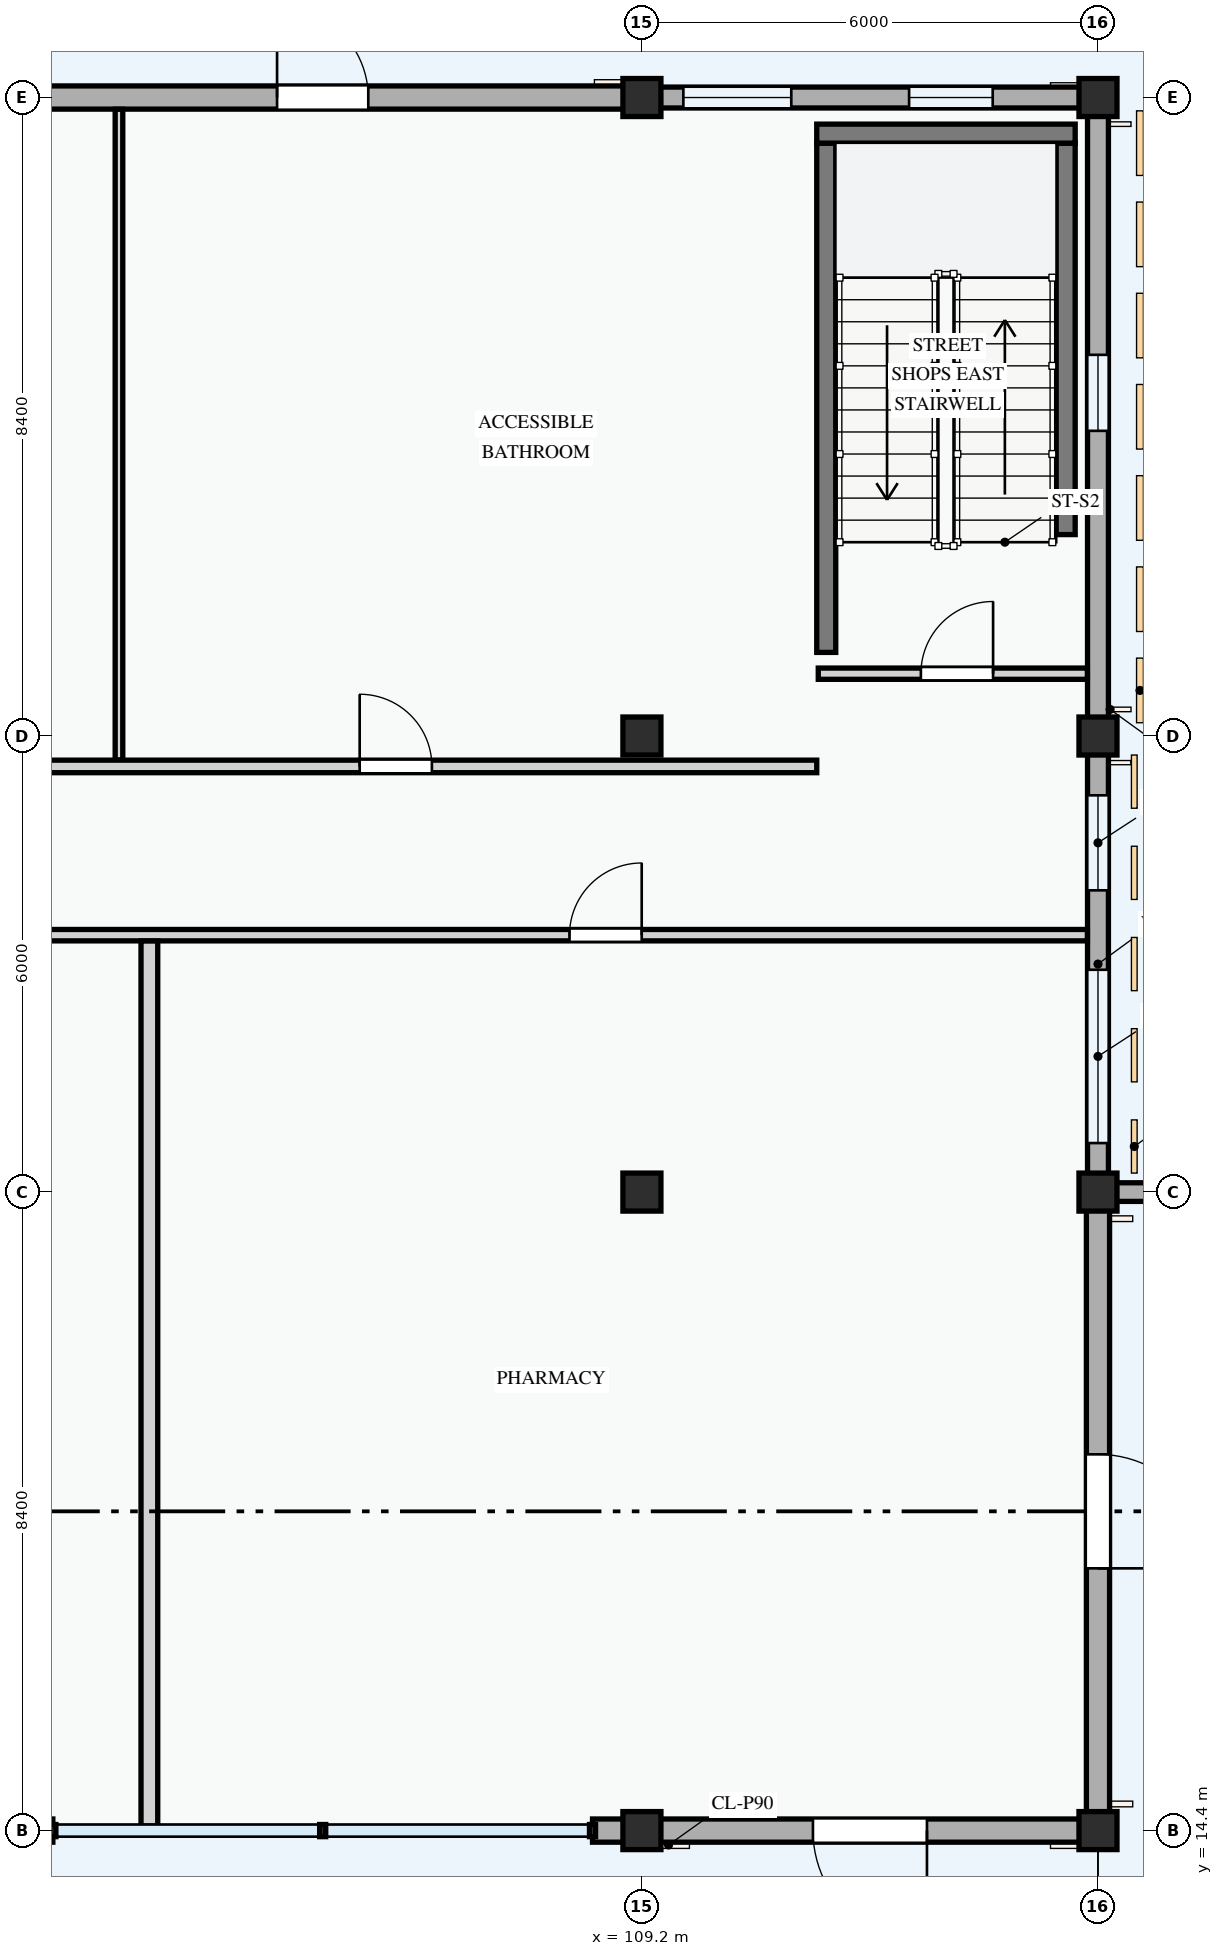
"""IFC4 building model, lengths in metres.
Left out: names, types, materials, properties, quantities, classifications, styles, units other than length and angle.
Written with IfcOpenShell. Run it as: python <this file> out.ifc"""

import sys

from ifc_helpers import new_model, si_unit, direction, frame, frame_2d, origin, origin_2d, place, context, subcontext, project, spatial, rectangle, circle, extrude, element, fill, save


model = new_model("IFC4")
c1 = context("Model", 3, precision=1e-05, world=origin(), true_north=direction((0.0, 1.0)))
c2 = subcontext(c1, "Body", "Model", "MODEL_VIEW")
j1 = project(units=[si_unit("LENGTHUNIT", "METRE"), si_unit("PLANEANGLEUNIT", "RADIAN")], contexts=[c1])
p1 = place(None, origin())
s1 = spatial("IfcSite", under=j1, at=p1, CompositionType="ELEMENT")
p2 = place(p1, origin())
s2 = spatial("IfcBuilding", under=s1, at=p2, CompositionType="ELEMENT")
p3 = place(p2, origin())
s3 = spatial("IfcBuildingStorey", under=s2, at=p3, CompositionType="ELEMENT", Elevation=0.0)
p4 = place(p3, frame((109.2, 14.4, 0.0), z_axis=(0.0, 0.0, 1.0), x_axis=(1.0, 0.0, 0.0)))
e1 = element("IfcColumn", 1, at=p4, inside=s3, PredefinedType="COLUMN", context=c2, shape_type="SweptSolid", body=[
    extrude(rectangle(XDim=0.5, YDim=0.5, at=origin_2d()), origin(), (0.0, 0.0, 1.0), 4.5),
])
for number, where, z_axis, x_axis in (
    (2, (109.2, 22.8, 0.0), (0.0, 0.0, 1.0), (1.0, 0.0, 0.0)),
    (3, (109.2, 28.8, 0.0), (0.0, 0.0, 1.0), (1.0, 0.0, 0.0)),
):
    element("IfcColumn", number, at=place(p3, frame(where, z_axis=z_axis, x_axis=x_axis)), inside=s3, PredefinedType="COLUMN", context=c2, shape_type="SweptSolid", body=[
        extrude(circle(Radius=0.25, at=origin_2d()), origin(), (0.0, 0.0, 1.0), 4.5),
    ])
for number, where, z_axis, x_axis in (
    (4, (109.2, 37.2, 0.0), (0.0, 0.0, 1.0), (1.0, 0.0, 0.0)),
    (5, (115.2, 14.4, 0.0), (0.0, 0.0, 1.0), (1.0, 0.0, 0.0)),
    (6, (115.2, 22.8, 0.0), (0.0, 0.0, 1.0), (1.0, 0.0, 0.0)),
    (7, (115.2, 28.8, 0.0), (0.0, 0.0, 1.0), (1.0, 0.0, 0.0)),
    (8, (115.2, 37.2, 0.0), (0.0, 0.0, 1.0), (1.0, 0.0, 0.0)),
):
    element("IfcColumn", number, at=place(p3, frame(where, z_axis=z_axis, x_axis=x_axis)), inside=s3, PredefinedType="COLUMN", context=c2, shape_type="SweptSolid", body=[
        extrude(rectangle(XDim=0.5, YDim=0.5, at=origin_2d()), origin(), (0.0, 0.0, 1.0), 4.5),
    ])
p5 = place(p3, frame((108.55, 14.4, 0.0), z_axis=(0.0, 0.0, 1.0), x_axis=(1.0, 0.0, 0.0)))
e9 = element("IfcWall", 9, at=p5, inside=s3, PredefinedType="STANDARD", context=c2, shape_type="SweptSolid", body=[
    extrude(rectangle(XDim=0.65, YDim=0.305, at=frame_2d((0.325, 0.0))), origin(), (0.0, 0.0, 1.0), 3.485),
])
p6 = place(p3, frame((109.2, 14.4, 0.0), z_axis=(0.0, 0.0, 1.0), x_axis=(1.0, 0.0, 0.0)))
e10 = element("IfcWall", 10, at=p6, inside=s3, PredefinedType="STANDARD", context=c2, shape_type="SweptSolid", body=[
    extrude(rectangle(XDim=6.0, YDim=0.305, at=frame_2d((3.0, 0.0))), origin(), (0.0, 0.0, 1.0), 3.585),
])
p7 = place(p6, frame((2.25, 0.0, 0.0)))
e11 = element("IfcOpeningElement", 11, at=p7, cuts=e10, PredefinedType="OPENING", context=c2, shape_type="SweptSolid", body=[
    extrude(rectangle(XDim=1.5, YDim=2.3, at=frame_2d((0.75, 1.15))), frame((0.0, 0.163, 0.0), z_axis=(0.0, -1.0, 0.0), x_axis=(1.0, 0.0, 0.0)), (0.0, 0.0, 1.0), 0.325),
])
p8 = place(p3, frame((115.2, 14.4, 0.0), z_axis=(0.0, 0.0, 1.0), x_axis=(0.0, 1.0, 0.0)))
e12 = element("IfcWall", 12, at=p8, inside=s3, PredefinedType="STANDARD", context=c2, shape_type="SweptSolid", body=[
    extrude(rectangle(XDim=8.4, YDim=0.305, at=frame_2d((4.2, 0.0))), origin(), (0.0, 0.0, 1.0), 3.485),
])
p9 = place(p8, frame((3.45, 0.0, 0.0)))
e13 = element("IfcOpeningElement", 13, at=p9, cuts=e12, PredefinedType="OPENING", context=c2, shape_type="SweptSolid", body=[
    extrude(rectangle(XDim=1.5, YDim=2.3, at=frame_2d((0.75, 1.15))), frame((0.0, 0.163, 0.0), z_axis=(0.0, -1.0, 0.0), x_axis=(1.0, 0.0, 0.0)), (0.0, 0.0, 1.0), 0.325),
])
p10 = place(p3, frame((115.2, 22.8, 0.0), z_axis=(0.0, 0.0, 1.0), x_axis=(0.0, 1.0, 0.0)))
e14 = element("IfcWall", 14, at=p10, inside=s3, PredefinedType="STANDARD", context=c2, shape_type="SweptSolid", body=[
    extrude(rectangle(XDim=6.0, YDim=0.275, at=frame_2d((3.0, 0.0))), origin(), (0.0, 0.0, 1.0), 3.585),
])
p11 = place(p10, frame((0.645, 0.0, 0.8)))
e15 = element("IfcOpeningElement", 15, at=p11, cuts=e14, PredefinedType="OPENING", context=c2, shape_type="SweptSolid", body=[
    extrude(rectangle(XDim=2.28, YDim=1.46, at=frame_2d((1.14, 0.73))), frame((0.0, 0.147, 0.0), z_axis=(0.0, -1.0, 0.0), x_axis=(1.0, 0.0, 0.0)), (0.0, 0.0, 1.0), 0.295),
])
p12 = place(p10, frame((3.97, 0.0, 0.8)))
e16 = element("IfcOpeningElement", 16, at=p12, cuts=e14, PredefinedType="OPENING", context=c2, shape_type="SweptSolid", body=[
    extrude(rectangle(XDim=1.25, YDim=1.45, at=frame_2d((0.625, 0.725))), frame((0.0, 0.147, 0.0), z_axis=(0.0, -1.0, 0.0), x_axis=(1.0, 0.0, 0.0)), (0.0, 0.0, 1.0), 0.295),
])
p13 = place(p3, frame((115.2, 28.8, 0.0), z_axis=(0.0, 0.0, 1.0), x_axis=(0.0, 1.0, 0.0)))
e17 = element("IfcWall", 17, at=p13, inside=s3, PredefinedType="STANDARD", context=c2, shape_type="SweptSolid", body=[
    extrude(rectangle(XDim=8.4, YDim=0.275, at=frame_2d((4.2, 0.0))), origin(), (0.0, 0.0, 1.0), 3.485),
])
p14 = place(p13, frame((4.015, 0.0, 0.8)))
e18 = element("IfcOpeningElement", 18, at=p14, cuts=e17, PredefinedType="OPENING", context=c2, shape_type="SweptSolid", body=[
    extrude(rectangle(XDim=1.0, YDim=1.25, at=frame_2d((0.5, 0.625))), frame((0.0, 0.147, 0.0), z_axis=(0.0, -1.0, 0.0), x_axis=(1.0, 0.0, 0.0)), (0.0, 0.0, 1.0), 0.295),
])
p15 = place(p3, frame((115.2, 37.2, 0.0), z_axis=(0.0, 0.0, 1.0), x_axis=(-1.0, 0.0, 0.0)))
e19 = element("IfcWall", 19, at=p15, inside=s3, PredefinedType="STANDARD", context=c2, shape_type="SweptSolid", body=[
    extrude(rectangle(XDim=6.0, YDim=0.275, at=frame_2d((3.0, 0.0))), origin(), (0.0, 0.0, 1.0), 3.585),
])
p16 = place(p15, frame((1.385, 0.0, 0.8)))
e20 = element("IfcOpeningElement", 20, at=p16, cuts=e19, PredefinedType="OPENING", context=c2, shape_type="SweptSolid", body=[
    extrude(rectangle(XDim=1.1, YDim=1.3, at=frame_2d((0.55, 0.65))), frame((0.0, 0.147, 0.0), z_axis=(0.0, -1.0, 0.0), x_axis=(1.0, 0.0, 0.0)), (0.0, 0.0, 1.0), 0.295),
])
p17 = place(p15, frame((4.035, 0.0, 0.8)))
e21 = element("IfcOpeningElement", 21, at=p17, cuts=e19, PredefinedType="OPENING", context=c2, shape_type="SweptSolid", body=[
    extrude(rectangle(XDim=1.42, YDim=1.38, at=frame_2d((0.71, 0.69))), frame((0.0, 0.147, 0.0), z_axis=(0.0, -1.0, 0.0), x_axis=(1.0, 0.0, 0.0)), (0.0, 0.0, 1.0), 0.295),
])
p18 = place(p3, frame((109.2, 37.2, 0.0), z_axis=(0.0, 0.0, 1.0), x_axis=(-1.0, 0.0, 0.0)))
e22 = element("IfcWall", 22, at=p18, inside=s3, PredefinedType="STANDARD", context=c2, shape_type="SweptSolid", body=[
    extrude(rectangle(XDim=8.4, YDim=0.305, at=frame_2d((4.2, 0.0))), origin(), (0.0, 0.0, 1.0), 3.485),
])
p19 = place(p18, frame((3.6, 0.0, 0.0)))
e23 = element("IfcOpeningElement", 23, at=p19, cuts=e22, PredefinedType="OPENING", context=c2, shape_type="SweptSolid", body=[
    extrude(rectangle(XDim=1.2, YDim=2.2, at=frame_2d((0.6, 1.1))), frame((0.0, 0.163, 0.0), z_axis=(0.0, -1.0, 0.0), x_axis=(1.0, 0.0, 0.0)), (0.0, 0.0, 1.0), 0.325),
])
p20 = place(p3, frame((115.2, 22.8, 0.0), z_axis=(0.0, 0.0, 1.0), x_axis=(1.0, 0.0, 0.0)))
e24 = element("IfcWall", 24, at=p20, inside=s3, PredefinedType="STANDARD", context=c2, shape_type="SweptSolid", body=[
    extrude(rectangle(XDim=8.4, YDim=0.245, at=frame_2d((4.2, 0.0))), origin(), (0.0, 0.0, 1.0), 2.35),
])
p21 = place(p20, frame((3.275, 0.0, 0.0)))
e25 = element("IfcOpeningElement", 25, at=p21, cuts=e24, PredefinedType="OPENING", context=c2, shape_type="SweptSolid", body=[
    extrude(rectangle(XDim=1.85, YDim=2.15, at=frame_2d((0.925, 1.075))), frame((0.0, 0.133, 0.0), z_axis=(0.0, -1.0, 0.0), x_axis=(1.0, 0.0, 0.0)), (0.0, 0.0, 1.0), 0.265),
])
p22 = place(p3, frame((114.775, 31.45, 0.0), z_axis=(0.0, 0.0, 1.0), x_axis=(0.0, 1.0, 0.0)))
e26 = element("IfcWall", 26, at=p22, inside=s3, PredefinedType="SHEAR", context=c2, shape_type="SweptSolid", body=[
    extrude(rectangle(XDim=5.15, YDim=0.25, at=frame_2d((2.575, 0.0))), origin(), (0.0, 0.0, 1.0), 4.2),
])
p23 = place(p3, frame((111.625, 29.9, 0.0), z_axis=(0.0, 0.0, 1.0), x_axis=(0.0, 1.0, 0.0)))
e27 = element("IfcWall", 27, at=p23, inside=s3, PredefinedType="SHEAR", context=c2, shape_type="SweptSolid", body=[
    extrude(rectangle(XDim=6.7, YDim=0.25, at=frame_2d((3.35, 0.0))), origin(), (0.0, 0.0, 1.0), 4.2),
])
p24 = place(p3, frame((114.9, 36.725, 0.0), z_axis=(0.0, 0.0, 1.0), x_axis=(-1.0, 0.0, 0.0)))
e28 = element("IfcWall", 28, at=p24, inside=s3, PredefinedType="SHEAR", context=c2, shape_type="SweptSolid", body=[
    extrude(rectangle(XDim=3.4, YDim=0.25, at=frame_2d((1.7, 0.0))), origin(), (0.0, 0.0, 1.0), 4.2),
])
p25 = place(p3, frame((66.139, 26.18, 0.0), z_axis=(0.0, 0.0, 1.0), x_axis=(1.0, 0.0, 0.0)))
e29 = element("IfcWall", 29, at=p25, inside=s3, PredefinedType="PARTITIONING", context=c2, shape_type="SweptSolid", body=[
    extrude(rectangle(XDim=48.921, YDim=0.15, at=frame_2d((24.46, 0.0))), origin(), (0.0, 0.0, 1.0), 4.2),
])
p26 = place(p25, frame((6.817, 0.0, 0.0)))
e30 = element("IfcOpeningElement", 30, at=p26, cuts=e29, PredefinedType="OPENING", context=c2, shape_type="SweptSolid", body=[
    extrude(rectangle(XDim=0.95, YDim=2.1, at=frame_2d((0.475, 1.05))), frame((0.0, 0.085, 0.0), z_axis=(0.0, -1.0, 0.0), x_axis=(1.0, 0.0, 0.0)), (0.0, 0.0, 1.0), 0.17),
])
p27 = place(p25, frame((18.263, 0.0, 0.0)))
e31 = element("IfcOpeningElement", 31, at=p27, cuts=e29, PredefinedType="OPENING", context=c2, shape_type="SweptSolid", body=[
    extrude(rectangle(XDim=0.95, YDim=2.1, at=frame_2d((0.475, 1.05))), frame((0.0, 0.085, 0.0), z_axis=(0.0, -1.0, 0.0), x_axis=(1.0, 0.0, 0.0)), (0.0, 0.0, 1.0), 0.17),
])
p28 = place(p25, frame((31.139, 0.0, 0.0)))
e32 = element("IfcOpeningElement", 32, at=p28, cuts=e29, PredefinedType="OPENING", context=c2, shape_type="SweptSolid", body=[
    extrude(rectangle(XDim=0.95, YDim=2.1, at=frame_2d((0.475, 1.05))), frame((0.0, 0.085, 0.0), z_axis=(0.0, -1.0, 0.0), x_axis=(1.0, 0.0, 0.0)), (0.0, 0.0, 1.0), 0.17),
])
p29 = place(p25, frame((42.108, 0.0, 0.0)))
e33 = element("IfcOpeningElement", 33, at=p29, cuts=e29, PredefinedType="OPENING", context=c2, shape_type="SweptSolid", body=[
    extrude(rectangle(XDim=0.95, YDim=2.1, at=frame_2d((0.475, 1.05))), frame((0.0, 0.085, 0.0), z_axis=(0.0, -1.0, 0.0), x_axis=(1.0, 0.0, 0.0)), (0.0, 0.0, 1.0), 0.17),
])
p30 = place(p3, frame((102.32, 28.485, 0.0), z_axis=(0.0, 0.0, 1.0), x_axis=(0.0, 1.0, 0.0)))
e34 = element("IfcWall", 34, at=p30, inside=s3, PredefinedType="PARTITIONING", context=c2, shape_type="SweptSolid", body=[
    extrude(rectangle(XDim=8.561, YDim=0.1, at=frame_2d((4.28, 0.0))), origin(), (0.0, 0.0, 1.0), 4.2),
])
p31 = place(p3, frame((111.52, 29.62, 0.0), z_axis=(0.0, 0.0, 1.0), x_axis=(1.0, 0.0, 0.0)))
e35 = element("IfcWall", 35, at=p31, inside=s3, PredefinedType="PARTITIONING", context=c2, shape_type="SweptSolid", body=[
    extrude(rectangle(XDim=3.541, YDim=0.148, at=frame_2d((1.77, 0.0))), origin(), (0.0, 0.0, 1.0), 4.2),
])
p32 = place(p31, frame((1.35, 0.0, 0.0)))
e36 = element("IfcOpeningElement", 36, at=p32, cuts=e35, PredefinedType="OPENING", context=c2, shape_type="SweptSolid", body=[
    extrude(rectangle(XDim=0.95, YDim=2.1, at=frame_2d((0.475, 1.05))), frame((0.0, 0.084, 0.0), z_axis=(0.0, -1.0, 0.0), x_axis=(1.0, 0.0, 0.0)), (0.0, 0.0, 1.0), 0.168),
])
p33 = place(p3, frame((69.75, 28.4, 0.0), z_axis=(0.0, 0.0, 1.0), x_axis=(1.0, 0.0, 0.0)))
e37 = element("IfcWall", 37, at=p33, inside=s3, PredefinedType="PARTITIONING", context=c2, shape_type="SweptSolid", body=[
    extrude(rectangle(XDim=41.75, YDim=0.165, at=frame_2d((20.875, 0.0))), origin(), (0.0, 0.0, 1.0), 3.485),
])
p34 = place(p33, frame((11.781, 0.0, 0.0)))
e38 = element("IfcOpeningElement", 38, at=p34, cuts=e37, PredefinedType="OPENING", context=c2, shape_type="SweptSolid", body=[
    extrude(rectangle(XDim=1.1, YDim=2.15, at=frame_2d((0.55, 1.075))), frame((0.0, 0.093, 0.0), z_axis=(0.0, -1.0, 0.0), x_axis=(1.0, 0.0, 0.0)), (0.0, 0.0, 1.0), 0.185),
])
p35 = place(p33, frame((26.858, 0.0, 0.0)))
e39 = element("IfcOpeningElement", 39, at=p35, cuts=e37, PredefinedType="OPENING", context=c2, shape_type="SweptSolid", body=[
    extrude(rectangle(XDim=0.95, YDim=2.1, at=frame_2d((0.475, 1.05))), frame((0.0, 0.093, 0.0), z_axis=(0.0, -1.0, 0.0), x_axis=(1.0, 0.0, 0.0)), (0.0, 0.0, 1.0), 0.185),
])
p36 = place(p33, frame((35.737, 0.0, 0.0)))
e40 = element("IfcOpeningElement", 40, at=p36, cuts=e37, PredefinedType="OPENING", context=c2, shape_type="SweptSolid", body=[
    extrude(rectangle(XDim=0.95, YDim=2.1, at=frame_2d((0.475, 1.05))), frame((0.0, 0.093, 0.0), z_axis=(0.0, -1.0, 0.0), x_axis=(1.0, 0.0, 0.0)), (0.0, 0.0, 1.0), 0.185),
])
p37 = place(p3, frame((102.72, 14.46, 0.0), z_axis=(0.0, 0.0, 1.0), x_axis=(0.0, 1.0, 0.0)))
e41 = element("IfcWall", 41, at=p37, inside=s3, PredefinedType="PARTITIONING", context=c2, shape_type="SweptSolid", body=[
    extrude(rectangle(XDim=11.643, YDim=0.22, at=frame_2d((5.822, 0.0))), origin(), (0.0, 0.0, 1.0), 4.2),
])
p38 = place(p7, frame((1.5, 0.0, 0.0), z_axis=(0.0, 0.0, 1.0), x_axis=(-1.0, 0.0, 0.0)))
e42 = element("IfcDoor", 42, at=p38, inside=s3, OperationType="SINGLE_SWING_LEFT", PredefinedType="DOOR", context=c2, shape_type="SweptSolid", body=[
    extrude(rectangle(XDim=1.5, YDim=2.3, at=frame_2d((0.75, 1.15))), frame((0.0, 0.025, 0.0), z_axis=(0.0, -1.0, 0.0), x_axis=(1.0, 0.0, 0.0)), (0.0, 0.0, 1.0), 0.05),
])
fill(e11, e42)
p39 = place(p9, frame((1.5, 0.0, 0.0), z_axis=(0.0, 0.0, 1.0), x_axis=(-1.0, 0.0, 0.0)))
e43 = element("IfcDoor", 43, at=p39, inside=s3, OperationType="SINGLE_SWING_RIGHT", PredefinedType="DOOR", context=c2, shape_type="SweptSolid", body=[
    extrude(rectangle(XDim=1.5, YDim=2.3, at=frame_2d((0.75, 1.15))), frame((0.0, 0.025, 0.0), z_axis=(0.0, -1.0, 0.0), x_axis=(1.0, 0.0, 0.0)), (0.0, 0.0, 1.0), 0.05),
])
fill(e13, e43)
p40 = place(p11, origin())
e44 = element("IfcWindow", 44, at=p40, inside=s3, PartitioningType="DOUBLE_PANEL_VERTICAL", PredefinedType="WINDOW", context=c2, shape_type="SweptSolid", body=[
    extrude(rectangle(XDim=2.28, YDim=1.46, at=frame_2d((1.14, 0.73))), frame((0.0, 0.03, 0.0), z_axis=(0.0, -1.0, 0.0), x_axis=(1.0, 0.0, 0.0)), (0.0, 0.0, 1.0), 0.06),
])
fill(e15, e44)
p41 = place(p12, origin())
e45 = element("IfcWindow", 45, at=p41, inside=s3, PartitioningType="SINGLE_PANEL", PredefinedType="WINDOW", context=c2, shape_type="SweptSolid", body=[
    extrude(rectangle(XDim=1.25, YDim=1.45, at=frame_2d((0.625, 0.725))), frame((0.0, 0.03, 0.0), z_axis=(0.0, -1.0, 0.0), x_axis=(1.0, 0.0, 0.0)), (0.0, 0.0, 1.0), 0.06),
])
fill(e16, e45)
p42 = place(p14, origin())
e46 = element("IfcWindow", 46, at=p42, inside=s3, PartitioningType="SINGLE_PANEL", PredefinedType="WINDOW", context=c2, shape_type="SweptSolid", body=[
    extrude(rectangle(XDim=1.0, YDim=1.25, at=frame_2d((0.5, 0.625))), frame((0.0, 0.03, 0.0), z_axis=(0.0, -1.0, 0.0), x_axis=(1.0, 0.0, 0.0)), (0.0, 0.0, 1.0), 0.06),
])
fill(e18, e46)
p43 = place(p16, origin())
e47 = element("IfcWindow", 47, at=p43, inside=s3, PartitioningType="SINGLE_PANEL", PredefinedType="WINDOW", context=c2, shape_type="SweptSolid", body=[
    extrude(rectangle(XDim=1.1, YDim=1.3, at=frame_2d((0.55, 0.65))), frame((0.0, 0.03, 0.0), z_axis=(0.0, -1.0, 0.0), x_axis=(1.0, 0.0, 0.0)), (0.0, 0.0, 1.0), 0.06),
])
fill(e20, e47)
p44 = place(p17, origin())
e48 = element("IfcWindow", 48, at=p44, inside=s3, PartitioningType="SINGLE_PANEL", PredefinedType="WINDOW", context=c2, shape_type="SweptSolid", body=[
    extrude(rectangle(XDim=1.42, YDim=1.38, at=frame_2d((0.71, 0.69))), frame((0.0, 0.03, 0.0), z_axis=(0.0, -1.0, 0.0), x_axis=(1.0, 0.0, 0.0)), (0.0, 0.0, 1.0), 0.06),
])
fill(e21, e48)
p45 = place(p19, frame((1.2, 0.0, 0.0), z_axis=(0.0, 0.0, 1.0), x_axis=(-1.0, 0.0, 0.0)))
e49 = element("IfcDoor", 49, at=p45, inside=s3, OperationType="SINGLE_SWING_LEFT", PredefinedType="DOOR", context=c2, shape_type="SweptSolid", body=[
    extrude(rectangle(XDim=1.2, YDim=2.2, at=frame_2d((0.6, 1.1))), frame((0.0, 0.025, 0.0), z_axis=(0.0, -1.0, 0.0), x_axis=(1.0, 0.0, 0.0)), (0.0, 0.0, 1.0), 0.05),
])
fill(e23, e49)
p46 = place(p29, origin())
e50 = element("IfcDoor", 50, at=p46, inside=s3, OperationType="SINGLE_SWING_RIGHT", PredefinedType="DOOR", context=c2, shape_type="SweptSolid", body=[
    extrude(rectangle(XDim=0.95, YDim=2.1, at=frame_2d((0.475, 1.05))), frame((0.0, 0.025, 0.0), z_axis=(0.0, -1.0, 0.0), x_axis=(1.0, 0.0, 0.0)), (0.0, 0.0, 1.0), 0.05),
])
fill(e33, e50)
p47 = place(p32, origin())
e51 = element("IfcDoor", 51, at=p47, inside=s3, OperationType="SINGLE_SWING_RIGHT", PredefinedType="DOOR", context=c2, shape_type="SweptSolid", body=[
    extrude(rectangle(XDim=0.95, YDim=2.1, at=frame_2d((0.475, 1.05))), frame((0.0, 0.025, 0.0), z_axis=(0.0, -1.0, 0.0), x_axis=(1.0, 0.0, 0.0)), (0.0, 0.0, 1.0), 0.05),
])
fill(e36, e51)
p48 = place(p36, origin())
e52 = element("IfcDoor", 52, at=p48, inside=s3, OperationType="SINGLE_SWING_LEFT", PredefinedType="DOOR", context=c2, shape_type="SweptSolid", body=[
    extrude(rectangle(XDim=0.95, YDim=2.1, at=frame_2d((0.475, 1.05))), frame((0.0, 0.025, 0.0), z_axis=(0.0, -1.0, 0.0), x_axis=(1.0, 0.0, 0.0)), (0.0, 0.0, 1.0), 0.05),
])
fill(e40, e52)
save(model, sys.argv[1])
